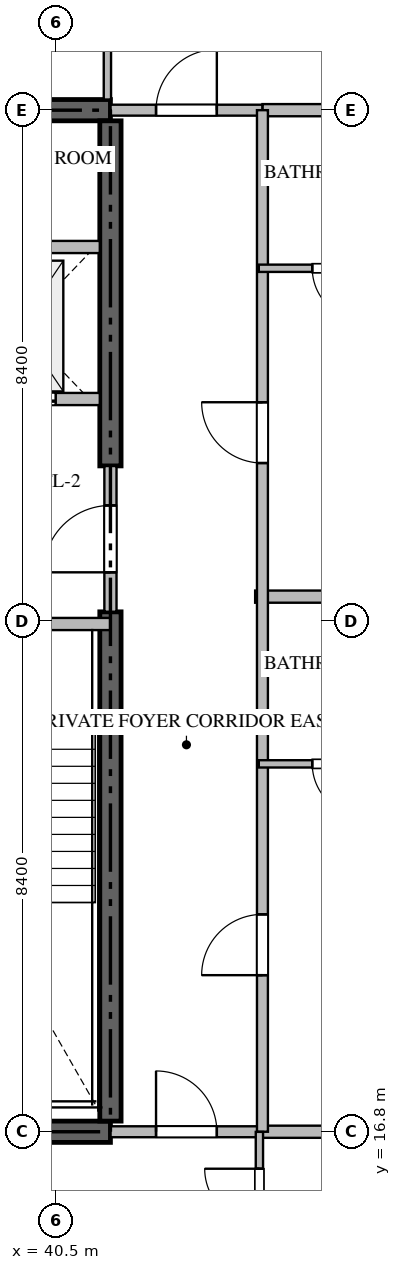
"""IFC4 building model, lengths in metres.
Left out: names, types, materials, properties, quantities, classifications, styles, units other than length and angle.
Written with IfcOpenShell. Run it as: python <this file> out.ifc"""

import sys

from ifc_helpers import new_model, si_unit, direction, frame, frame_2d, origin, place, context, subcontext, project, spatial, rectangle, extrude, source, transform, mapped, element, fill, save


model = new_model("IFC4")
c1 = context("Model", 3, precision=1e-05, world=origin(), true_north=direction((0.0, 1.0)))
c2 = subcontext(c1, "Body", "Model", "MODEL_VIEW")
j1 = project(units=[si_unit("LENGTHUNIT", "METRE"), si_unit("PLANEANGLEUNIT", "RADIAN")], contexts=[c1])
p1 = place(None, origin())
s1 = spatial("IfcSite", under=j1, at=p1, CompositionType="ELEMENT")
p2 = place(p1, origin())
s2 = spatial("IfcBuilding", under=s1, at=p2, CompositionType="ELEMENT")
p3 = place(p2, frame((0.0, 0.0, 260.5)))
s3 = spatial("IfcBuildingStorey", under=s2, at=p3, CompositionType="ELEMENT", Elevation=260.5)
for number, where, z_axis, x_axis in (
    (1, (23.4, 16.8, -0.26), (0.0, 0.0, 1.0), (1.0, 0.0, 0.0)),
    (2, (41.4, 33.6, -0.26), (0.0, 0.0, 1.0), (-1.0, 0.0, 0.0)),
):
    element("IfcWall", number, at=place(p3, frame(where, z_axis=z_axis, x_axis=x_axis)), inside=s3, PredefinedType="SHEAR", context=c2, shape_type="SweptSolid", body=[
        extrude(rectangle(XDim=18.0, YDim=0.35, at=frame_2d((9.0, 0.0))), origin(), (0.0, 0.0, 1.0), 3.848),
    ])
p4 = place(p3, frame((41.4, 16.975, -0.26), z_axis=(0.0, 0.0, 1.0), x_axis=(0.0, 1.0, 0.0)))
e3 = element("IfcWall", 3, at=p4, inside=s3, PredefinedType="SHEAR", context=c2, shape_type="SweptSolid", body=[
    extrude(rectangle(XDim=8.375, YDim=0.35, at=frame_2d((4.188, 0.0))), origin(), (0.0, 0.0, 1.0), 3.848),
])
p5 = place(p3, frame((41.4, 27.75, -0.26), z_axis=(0.0, 0.0, 1.0), x_axis=(0.0, 1.0, 0.0)))
e4 = element("IfcWall", 4, at=p5, inside=s3, PredefinedType="SHEAR", context=c2, shape_type="SweptSolid", body=[
    extrude(rectangle(XDim=5.675, YDim=0.35, at=frame_2d((2.837, 0.0))), origin(), (0.0, 0.0, 1.0), 3.848),
])
p6 = place(p3, frame((36.95, 25.15, 0.0), z_axis=(0.0, 0.0, 1.0), x_axis=(1.0, 0.0, 0.0)))
e5 = element("IfcWall", 5, at=p6, inside=s3, PredefinedType="STANDARD", context=c2, shape_type="SweptSolid", body=[
    extrude(rectangle(XDim=4.45, YDim=0.2, at=frame_2d((2.225, 0.0))), origin(), (0.0, 0.0, 1.0), 3.59),
])
p7 = place(p6, frame((1.65, 0.0, 0.0)))
e6 = element("IfcOpeningElement", 6, at=p7, cuts=e5, PredefinedType="OPENING", context=c2, shape_type="SweptSolid", body=[
    extrude(rectangle(XDim=1.1, YDim=2.15, at=frame_2d((0.55, 1.075))), frame((0.0, 0.11, 0.0), z_axis=(0.0, -1.0, 0.0), x_axis=(1.0, 0.0, 0.0)), (0.0, 0.0, 1.0), 0.22),
])
p8 = place(p3, frame((38.75, 28.85, 0.0), z_axis=(0.0, 0.0, 1.0), x_axis=(1.0, 0.0, 0.0)))
e7 = element("IfcWall", 7, at=p8, inside=s3, PredefinedType="STANDARD", context=c2, shape_type="SweptSolid", body=[
    extrude(rectangle(XDim=2.475, YDim=0.2, at=frame_2d((1.238, 0.0))), origin(), (0.0, 0.0, 1.0), 3.59),
])
p9 = place(p8, frame((0.55, 0.0, 0.0)))
e8 = element("IfcOpeningElement", 8, at=p9, cuts=e7, PredefinedType="OPENING", context=c2, shape_type="SweptSolid", body=[
    extrude(rectangle(XDim=1.2, YDim=2.2, at=frame_2d((0.6, 1.1))), frame((0.0, 0.11, 0.0), z_axis=(0.0, -1.0, 0.0), x_axis=(1.0, 0.0, 0.0)), (0.0, 0.0, 1.0), 0.22),
])
p10 = place(p3, frame((38.75, 31.35, 0.0), z_axis=(0.0, 0.0, 1.0), x_axis=(1.0, 0.0, 0.0)))
e9 = element("IfcWall", 9, at=p10, inside=s3, PredefinedType="STANDARD", context=c2, shape_type="SweptSolid", body=[
    extrude(rectangle(XDim=2.475, YDim=0.2, at=frame_2d((1.238, 0.0))), origin(), (0.0, 0.0, 1.0), 3.59),
])
p11 = place(p3, frame((41.4, 25.352, 0.0), z_axis=(0.0, 0.0, 1.0), x_axis=(0.0, 1.0, 0.0)))
e10 = element("IfcWall", 10, at=p11, inside=s3, PredefinedType="STANDARD", context=c2, shape_type="SweptSolid", body=[
    extrude(rectangle(XDim=2.396, YDim=0.2, at=frame_2d((1.198, 0.0))), origin(), (0.0, 0.0, 1.0), 3.59),
])
p12 = place(p11, frame((0.648, 0.0, 0.0)))
e11 = element("IfcOpeningElement", 11, at=p12, cuts=e10, PredefinedType="OPENING", context=c2, shape_type="SweptSolid", body=[
    extrude(rectangle(XDim=1.1, YDim=2.15, at=frame_2d((0.55, 1.075))), frame((0.0, 0.11, 0.0), z_axis=(0.0, -1.0, 0.0), x_axis=(1.0, 0.0, 0.0)), (0.0, 0.0, 1.0), 0.22),
])
p13 = place(p3, frame((43.78, 25.6, 0.0), z_axis=(0.0, 0.0, 1.0), x_axis=(1.0, 0.0, 0.0)))
e12 = element("IfcWall", 12, at=p13, inside=s3, PredefinedType="PARTITIONING", context=c2, shape_type="SweptSolid", body=[
    extrude(rectangle(XDim=13.538, YDim=0.2, at=frame_2d((6.769, 0.0))), origin(), (0.0, 0.0, 1.0), 3.59),
])
for number, where, z_axis, x_axis in (
    (13, (43.9, 16.8, 0.0), (0.0, 0.0, 1.0), (1.0, 0.0, 0.0)),
    (14, (43.9, 33.6, 0.0), (0.0, 0.0, 1.0), (1.0, 0.0, 0.0)),
):
    element("IfcWall", number, at=place(p3, frame(where, z_axis=z_axis, x_axis=x_axis)), inside=s3, PredefinedType="PARTITIONING", context=c2, shape_type="SweptSolid", body=[
        extrude(rectangle(XDim=13.418, YDim=0.2, at=frame_2d((6.709, 0.0))), origin(), (0.0, 0.0, 1.0), 3.59),
    ])
p14 = place(p3, frame((41.402, 16.8, 0.0), z_axis=(0.0, 0.0, 1.0), x_axis=(1.0, 0.0, 0.0)))
e15 = element("IfcWall", 15, at=p14, inside=s3, PredefinedType="PARTITIONING", context=c2, shape_type="SweptSolid", body=[
    extrude(rectangle(XDim=2.496, YDim=0.18, at=frame_2d((1.248, 0.0))), origin(), (0.0, 0.0, 1.0), 3.59),
])
p15 = place(p14, frame((0.748, 0.0, 0.0)))
e16 = element("IfcOpeningElement", 16, at=p15, cuts=e15, PredefinedType="OPENING", context=c2, shape_type="SweptSolid", body=[
    extrude(rectangle(XDim=1.0, YDim=2.15, at=frame_2d((0.5, 1.075))), frame((0.0, 0.1, 0.0), z_axis=(0.0, -1.0, 0.0), x_axis=(1.0, 0.0, 0.0)), (0.0, 0.0, 1.0), 0.2),
])
p16 = place(p3, frame((41.402, 33.6, 0.0), z_axis=(0.0, 0.0, 1.0), x_axis=(1.0, 0.0, 0.0)))
e17 = element("IfcWall", 17, at=p16, inside=s3, PredefinedType="PARTITIONING", context=c2, shape_type="SweptSolid", body=[
    extrude(rectangle(XDim=2.496, YDim=0.18, at=frame_2d((1.248, 0.0))), origin(), (0.0, 0.0, 1.0), 3.59),
])
p17 = place(p16, frame((0.748, 0.0, 0.0)))
e18 = element("IfcOpeningElement", 18, at=p17, cuts=e17, PredefinedType="OPENING", context=c2, shape_type="SweptSolid", body=[
    extrude(rectangle(XDim=1.0, YDim=2.15, at=frame_2d((0.5, 1.075))), frame((0.0, 0.1, 0.0), z_axis=(0.0, -1.0, 0.0), x_axis=(1.0, 0.0, 0.0)), (0.0, 0.0, 1.0), 0.2),
])
p18 = place(p3, frame((43.9, 16.8, 0.0), z_axis=(0.0, 0.0, 1.0), x_axis=(0.0, 1.0, 0.0)))
e19 = element("IfcWall", 19, at=p18, inside=s3, PredefinedType="PARTITIONING", context=c2, shape_type="SweptSolid", body=[
    extrude(rectangle(XDim=16.8, YDim=0.18, at=frame_2d((8.4, 0.0))), origin(), (0.0, 0.0, 1.0), 3.59),
])
p19 = place(p18, frame((2.575, 0.0, 0.0)))
e20 = element("IfcOpeningElement", 20, at=p19, cuts=e19, PredefinedType="OPENING", context=c2, shape_type="SweptSolid", body=[
    extrude(rectangle(XDim=1.0, YDim=2.15, at=frame_2d((0.5, 1.075))), frame((0.0, 0.1, 0.0), z_axis=(0.0, -1.0, 0.0), x_axis=(1.0, 0.0, 0.0)), (0.0, 0.0, 1.0), 0.2),
])
p20 = place(p18, frame((10.997, 0.0, 0.0)))
e21 = element("IfcOpeningElement", 21, at=p20, cuts=e19, PredefinedType="OPENING", context=c2, shape_type="SweptSolid", body=[
    extrude(rectangle(XDim=1.0, YDim=2.15, at=frame_2d((0.5, 1.075))), frame((0.0, 0.1, 0.0), z_axis=(0.0, -1.0, 0.0), x_axis=(1.0, 0.0, 0.0)), (0.0, 0.0, 1.0), 0.2),
])
p21 = place(p3, frame((43.85, 14.65, 0.0), z_axis=(0.0, 0.0, 1.0), x_axis=(0.0, 1.0, 0.0)))
e22 = element("IfcWall", 22, at=p21, inside=s3, PredefinedType="PARTITIONING", context=c2, shape_type="SweptSolid", body=[
    extrude(rectangle(XDim=2.148, YDim=0.12, at=frame_2d((1.074, 0.0))), origin(), (0.0, 0.0, 1.0), 3.59),
])
p22 = place(p21, frame((0.642, 0.0, 0.0)))
e23 = element("IfcOpeningElement", 23, at=p22, cuts=e22, PredefinedType="OPENING", context=c2, shape_type="SweptSolid", body=[
    extrude(rectangle(XDim=0.9, YDim=2.1, at=frame_2d((0.45, 1.05))), frame((0.0, 0.07, 0.0), z_axis=(0.0, -1.0, 0.0), x_axis=(1.0, 0.0, 0.0)), (0.0, 0.0, 1.0), 0.14),
])
p23 = place(p3, frame((41.35, 36.35, 0.0), z_axis=(0.0, 0.0, 1.0), x_axis=(0.0, -1.0, 0.0)))
e24 = element("IfcWall", 24, at=p23, inside=s3, PredefinedType="PARTITIONING", context=c2, shape_type="SweptSolid", body=[
    extrude(rectangle(XDim=2.575, YDim=0.12, at=frame_2d((1.288, 0.0))), origin(), (0.0, 0.0, 1.0), 3.59),
])
p24 = place(p3, frame((46.448, 22.85, 0.0), z_axis=(0.0, 0.0, 1.0), x_axis=(-1.0, 0.0, 0.0)))
e25 = element("IfcWall", 25, at=p24, inside=s3, PredefinedType="PARTITIONING", context=c2, shape_type="SweptSolid", body=[
    extrude(rectangle(XDim=2.608, YDim=0.12, at=frame_2d((1.304, 0.0))), origin(), (0.0, 0.0, 1.0), 3.59),
])
p25 = place(p24, frame((0.879, 0.0, 0.0)))
e26 = element("IfcOpeningElement", 26, at=p25, cuts=e25, PredefinedType="OPENING", context=c2, shape_type="SweptSolid", body=[
    extrude(rectangle(XDim=0.85, YDim=2.1, at=frame_2d((0.425, 1.05))), frame((0.0, 0.07, 0.0), z_axis=(0.0, -1.0, 0.0), x_axis=(1.0, 0.0, 0.0)), (0.0, 0.0, 1.0), 0.14),
])
p26 = place(p3, frame((46.448, 31.0, 0.0), z_axis=(0.0, 0.0, 1.0), x_axis=(-1.0, 0.0, 0.0)))
e27 = element("IfcWall", 27, at=p26, inside=s3, PredefinedType="PARTITIONING", context=c2, shape_type="SweptSolid", body=[
    extrude(rectangle(XDim=2.608, YDim=0.12, at=frame_2d((1.304, 0.0))), origin(), (0.0, 0.0, 1.0), 3.59),
])
p27 = place(p26, frame((0.879, 0.0, 0.0)))
e28 = element("IfcOpeningElement", 28, at=p27, cuts=e27, PredefinedType="OPENING", context=c2, shape_type="SweptSolid", body=[
    extrude(rectangle(XDim=0.85, YDim=2.1, at=frame_2d((0.425, 1.05))), frame((0.0, 0.07, 0.0), z_axis=(0.0, -1.0, 0.0), x_axis=(1.0, 0.0, 0.0)), (0.0, 0.0, 1.0), 0.14),
])
m1 = source(origin(), c2, "Body", "SweptSolid", [
    extrude(rectangle(XDim=1.2, YDim=2.2, at=frame_2d((0.6, 1.1))), frame((0.0, 0.025, 0.0), z_axis=(0.0, -1.0, 0.0), x_axis=(1.0, 0.0, 0.0)), (0.0, 0.0, 1.0), 0.05),
])
p28 = place(p9, origin())
e29 = element("IfcDoor", 29, at=p28, inside=s3, OperationType="DOUBLE_DOOR_SLIDING", PredefinedType="DOOR", context=c2, shape_type="MappedRepresentation", body=[
    mapped(m1, transform((0.0, 0.0, 0.0), scale=1.0)),
])
fill(e8, e29)
m2 = source(origin(), c2, "Body", "SweptSolid", [
    extrude(rectangle(XDim=1.1, YDim=2.15, at=frame_2d((0.55, 1.075))), frame((0.0, 0.025, 0.0), z_axis=(0.0, -1.0, 0.0), x_axis=(1.0, 0.0, 0.0)), (0.0, 0.0, 1.0), 0.05),
])
p29 = place(p12, origin())
e30 = element("IfcDoor", 30, at=p29, inside=s3, OperationType="SINGLE_SWING_LEFT", PredefinedType="DOOR", context=c2, shape_type="MappedRepresentation", body=[
    mapped(m2, transform((0.0, 0.0, 0.0), scale=1.0)),
])
fill(e11, e30)
m3 = source(origin(), c2, "Body", "SweptSolid", [
    extrude(rectangle(XDim=1.0, YDim=2.15, at=frame_2d((0.5, 1.075))), frame((0.0, 0.025, 0.0), z_axis=(0.0, -1.0, 0.0), x_axis=(1.0, 0.0, 0.0)), (0.0, 0.0, 1.0), 0.05),
])
p30 = place(p15, origin())
e31 = element("IfcDoor", 31, at=p30, inside=s3, OperationType="SINGLE_SWING_LEFT", PredefinedType="DOOR", context=c2, shape_type="MappedRepresentation", body=[
    mapped(m3, transform((0.0, 0.0, 0.0), scale=1.0)),
])
fill(e16, e31)
p31 = place(p17, origin())
e32 = element("IfcDoor", 32, at=p31, inside=s3, OperationType="SINGLE_SWING_RIGHT", PredefinedType="DOOR", context=c2, shape_type="MappedRepresentation", body=[
    mapped(m3, transform((0.0, 0.0, 0.0), scale=1.0)),
])
fill(e18, e32)
p32 = place(p19, origin())
e33 = element("IfcDoor", 33, at=p32, inside=s3, OperationType="SINGLE_SWING_LEFT", PredefinedType="DOOR", context=c2, shape_type="MappedRepresentation", body=[
    mapped(m3, transform((0.0, 0.0, 0.0), scale=1.0)),
])
fill(e20, e33)
p33 = place(p20, origin())
e34 = element("IfcDoor", 34, at=p33, inside=s3, OperationType="SINGLE_SWING_RIGHT", PredefinedType="DOOR", context=c2, shape_type="MappedRepresentation", body=[
    mapped(m3, transform((0.0, 0.0, 0.0), scale=1.0)),
])
fill(e21, e34)
m4 = source(origin(), c2, "Body", "SweptSolid", [
    extrude(rectangle(XDim=0.9, YDim=2.1, at=frame_2d((0.45, 1.05))), frame((0.0, 0.025, 0.0), z_axis=(0.0, -1.0, 0.0), x_axis=(1.0, 0.0, 0.0)), (0.0, 0.0, 1.0), 0.05),
])
p34 = place(p22, origin())
e35 = element("IfcDoor", 35, at=p34, inside=s3, OperationType="SINGLE_SWING_RIGHT", PredefinedType="DOOR", context=c2, shape_type="MappedRepresentation", body=[
    mapped(m4, transform((0.0, 0.0, 0.0), scale=1.0)),
])
fill(e23, e35)
m5 = source(origin(), c2, "Body", "SweptSolid", [
    extrude(rectangle(XDim=0.85, YDim=2.1, at=frame_2d((0.425, 1.05))), frame((0.0, 0.025, 0.0), z_axis=(0.0, -1.0, 0.0), x_axis=(1.0, 0.0, 0.0)), (0.0, 0.0, 1.0), 0.05),
])
p35 = place(p25, origin())
e36 = element("IfcDoor", 36, at=p35, inside=s3, OperationType="SINGLE_SWING_LEFT", PredefinedType="DOOR", context=c2, shape_type="MappedRepresentation", body=[
    mapped(m5, transform((0.0, 0.0, 0.0), scale=1.0)),
])
fill(e26, e36)
p36 = place(p27, origin())
e37 = element("IfcDoor", 37, at=p36, inside=s3, OperationType="SINGLE_SWING_LEFT", PredefinedType="DOOR", context=c2, shape_type="MappedRepresentation", body=[
    mapped(m5, transform((0.0, 0.0, 0.0), scale=1.0)),
])
fill(e28, e37)
save(model, sys.argv[1])
